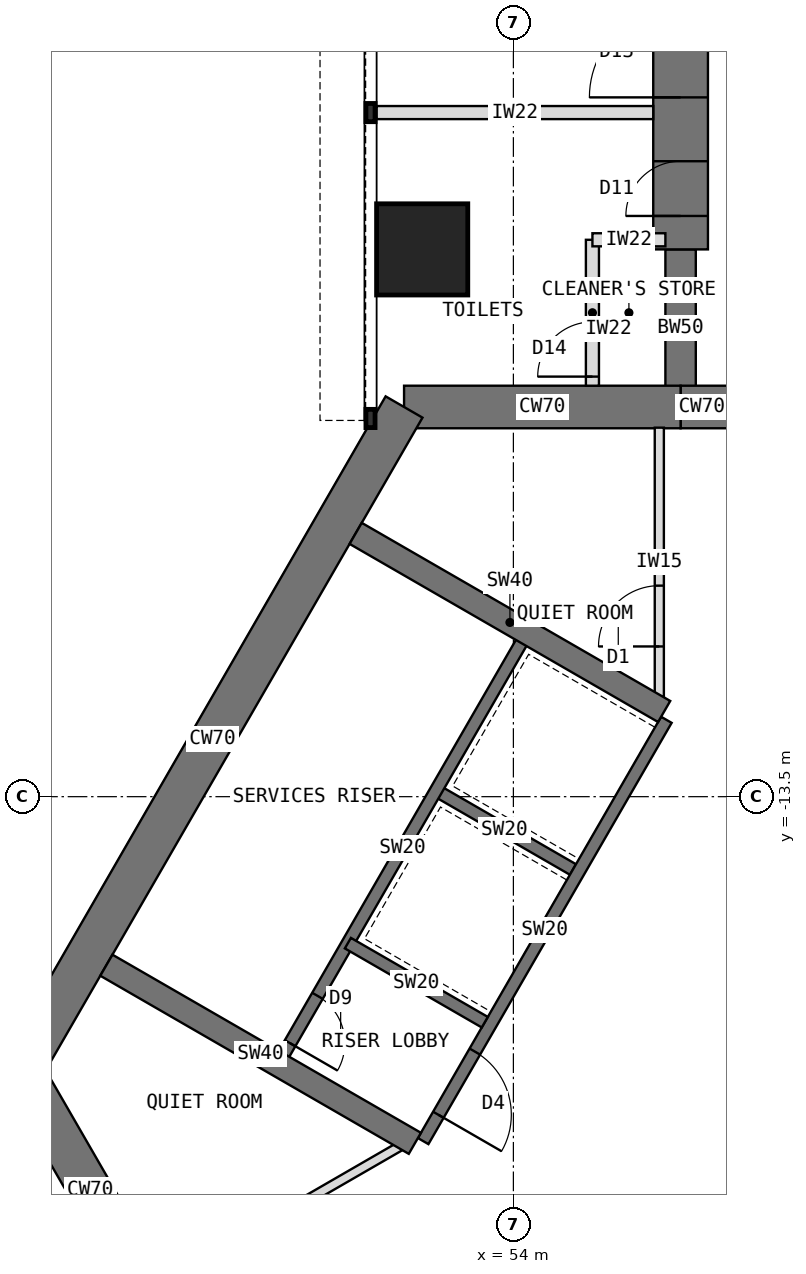
"""IFC4 building model, lengths in metres.
Left out: names, types, materials, properties, quantities, classifications, styles, units other than length and angle.
Written with IfcOpenShell. Run it as: python <this file> out.ifc"""

import sys

from ifc_helpers import new_model, si_unit, direction, frame, frame_2d, origin, origin_2d, place, context, subcontext, project, spatial, rectangle, extrude, element, fill, save


model = new_model("IFC4")
c1 = context("Model", 3, precision=1e-05, world=origin(), true_north=direction((0.0, 1.0)))
c2 = subcontext(c1, "Body", "Model", "MODEL_VIEW")
j1 = project(units=[si_unit("LENGTHUNIT", "METRE"), si_unit("PLANEANGLEUNIT", "RADIAN")], contexts=[c1])
p1 = place(None, origin())
s1 = spatial("IfcSite", under=j1, at=p1, CompositionType="ELEMENT")
p2 = place(p1, origin())
s2 = spatial("IfcBuilding", under=s1, at=p2, CompositionType="ELEMENT")
p3 = place(p2, frame((0.0, 0.0, 36.5)))
s3 = spatial("IfcBuildingStorey", under=s2, at=p3, CompositionType="ELEMENT", Elevation=36.5)
p4 = place(p3, frame((60.25, -7.092, 0.0), z_axis=(0.0, 0.0, 1.0), x_axis=(-1.0, 0.0, 0.0)))
e1 = element("IfcWall", 1, at=p4, inside=s3, PredefinedType="SHEAR", context=c2, shape_type="SweptSolid", body=[
    extrude(rectangle(XDim=3.5, YDim=0.7, at=frame_2d((1.75, 0.0))), origin(), (0.0, 0.0, 1.0), 4.0),
])
p5 = place(p4, frame((0.85, 0.0, 0.0)))
e2 = element("IfcOpeningElement", 2, at=p5, cuts=e1, PredefinedType="OPENING", context=c2, shape_type="SweptSolid", body=[
    extrude(rectangle(XDim=1.8, YDim=2.1, at=frame_2d((0.9, 1.05))), frame((0.0, 0.36, 0.0), z_axis=(0.0, -1.0, 0.0), x_axis=(1.0, 0.0, 0.0)), (0.0, 0.0, 1.0), 0.72),
])
p6 = place(p3, frame((56.75, -7.092, 0.0), z_axis=(0.0, 0.0, 1.0), x_axis=(-1.0, 0.0, 0.0)))
e3 = element("IfcWall", 3, at=p6, inside=s3, PredefinedType="SHEAR", context=c2, shape_type="SweptSolid", body=[
    extrude(rectangle(XDim=4.548, YDim=0.7, at=frame_2d((2.274, 0.0))), origin(), (0.0, 0.0, 1.0), 4.0),
])
p7 = place(p3, frame((52.202, -7.092, 0.0), z_axis=(0.0, 0.0, 1.0), x_axis=(-0.500005998175, -0.866021940709, 0.0)))
e4 = element("IfcWall", 4, at=p7, inside=s3, PredefinedType="SHEAR", context=c2, shape_type="SweptSolid", body=[
    extrude(rectangle(XDim=12.596, YDim=0.7, at=frame_2d((6.298, 0.0))), origin(), (0.0, 0.0, 1.0), 4.0),
])
p8 = place(p3, frame((45.904, -18.0, 0.0), z_axis=(0.0, 0.0, 1.0), x_axis=(0.500024481964, -0.866011268655, 0.0)))
e5 = element("IfcWall", 5, at=p8, inside=s3, PredefinedType="SHEAR", context=c2, shape_type="SweptSolid", body=[
    extrude(rectangle(XDim=4.548, YDim=0.7, at=frame_2d((2.274, 0.0))), origin(), (0.0, 0.0, 1.0), 4.0),
])
p9 = place(p3, frame((56.75, -7.092, 0.0), z_axis=(0.0, 0.0, 1.0), x_axis=(0.0, 1.0, 0.0)))
e6 = element("IfcWall", 6, at=p9, inside=s3, PredefinedType="SHEAR", context=c2, shape_type="SweptSolid", body=[
    extrude(rectangle(XDim=2.592, YDim=0.5, at=frame_2d((1.296, 0.0))), origin(), (0.0, 0.0, 1.0), 4.0),
])
p10 = place(p3, frame((56.75, -4.5, 0.0), z_axis=(0.0, 0.0, 1.0), x_axis=(0.0, 1.0, 0.0)))
e7 = element("IfcWall", 7, at=p10, inside=s3, PredefinedType="SHEAR", context=c2, shape_type="SweptSolid", body=[
    extrude(rectangle(XDim=13.2, YDim=0.9, at=frame_2d((6.6, 0.0))), origin(), (0.0, 0.0, 1.0), 4.0),
])
p11 = place(p10, frame((0.55, 0.0, 0.0)))
e8 = element("IfcOpeningElement", 8, at=p11, cuts=e7, PredefinedType="OPENING", context=c2, shape_type="SweptSolid", body=[
    extrude(rectangle(XDim=0.9, YDim=2.1, at=frame_2d((0.45, 1.05))), frame((0.0, 0.46, 0.0), z_axis=(0.0, -1.0, 0.0), x_axis=(1.0, 0.0, 0.0)), (0.0, 0.0, 1.0), 0.92),
])
p12 = place(p10, frame((2.5, 0.0, 0.0)))
e9 = element("IfcOpeningElement", 9, at=p12, cuts=e7, PredefinedType="OPENING", context=c2, shape_type="SweptSolid", body=[
    extrude(rectangle(XDim=1.5, YDim=2.1, at=frame_2d((0.75, 1.05))), frame((0.0, 0.46, 0.0), z_axis=(0.0, -1.0, 0.0), x_axis=(1.0, 0.0, 0.0)), (0.0, 0.0, 1.0), 0.92),
])
p13 = place(p3, frame((52.5, -4.5, 0.0), z_axis=(0.0, 0.0, 1.0), x_axis=(1.0, 0.0, 0.0)))
e10 = element("IfcColumn", 10, at=p13, inside=s3, PredefinedType="COLUMN", context=c2, shape_type="SweptSolid", body=[
    extrude(rectangle(XDim=1.5, YDim=1.5, at=origin_2d()), origin(), (0.0, 0.0, 1.0), 4.0),
])
p14 = place(p3, frame((56.516, -12.236, 0.0), z_axis=(0.0, 0.0, 1.0), x_axis=(-0.49999894854, -0.866026010844, 0.0)))
e11 = element("IfcWall", 11, at=p14, inside=s3, PredefinedType="SHEAR", context=c2, shape_type="SweptSolid", body=[
    extrude(rectangle(XDim=8.0, YDim=0.2, at=frame_2d((4.0, 0.0))), origin(), (0.0, 0.0, 1.0), 4.0),
])
p15 = place(p14, frame((6.3, 0.0, 0.0)))
e12 = element("IfcOpeningElement", 12, at=p15, cuts=e11, PredefinedType="OPENING", context=c2, shape_type="SweptSolid", body=[
    extrude(rectangle(XDim=1.2, YDim=2.1, at=frame_2d((0.6, 1.05))), frame((0.0, 0.11, 0.0), z_axis=(0.0, -1.0, 0.0), x_axis=(1.0, 0.0, 0.0)), (0.0, 0.0, 1.0), 0.22),
])
for number, where, z_axis, x_axis in (
    (13, (54.98, -14.697, 0.0), (0.0, 0.0, 1.0), (-0.866, 0.5, 0.0)),
    (14, (53.53, -17.209, 0.0), (0.0, 0.0, 1.0), (-0.866, 0.5, 0.0)),
):
    element("IfcWall", number, at=place(p3, frame(where, z_axis=z_axis, x_axis=x_axis)), inside=s3, PredefinedType="SHEAR", context=c2, shape_type="SweptSolid", body=[
        extrude(rectangle(XDim=2.6, YDim=0.2, at=frame_2d((1.3, 0.0))), origin(), (0.0, 0.0, 1.0), 4.0),
    ])
p16 = place(p3, frame((54.178, -10.886, 0.0), z_axis=(0.0, 0.0, 1.0), x_axis=(-0.49999894854, -0.866026010844, 0.0)))
e15 = element("IfcWall", 15, at=p16, inside=s3, PredefinedType="SHEAR", context=c2, shape_type="SweptSolid", body=[
    extrude(rectangle(XDim=8.0, YDim=0.2, at=frame_2d((4.0, 0.0))), origin(), (0.0, 0.0, 1.0), 4.0),
])
p17 = place(p16, frame((6.8, 0.0, 0.0)))
e16 = element("IfcOpeningElement", 16, at=p17, cuts=e15, PredefinedType="OPENING", context=c2, shape_type="SweptSolid", body=[
    extrude(rectangle(XDim=0.9, YDim=2.1, at=frame_2d((0.45, 1.05))), frame((0.0, 0.11, 0.0), z_axis=(0.0, -1.0, 0.0), x_axis=(1.0, 0.0, 0.0)), (0.0, 0.0, 1.0), 0.22),
])
for number, where, z_axis, x_axis in (
    (17, (52.38, -19.201, 0.0), (0.0, 0.0, 1.0), (-0.866, 0.5, 0.0)),
    (18, (56.48, -12.099, 0.0), (0.0, 0.0, 1.0), (-0.866, 0.5, 0.0)),
):
    element("IfcWall", number, at=place(p3, frame(where, z_axis=z_axis, x_axis=x_axis)), inside=s3, PredefinedType="SHEAR", context=c2, shape_type="SweptSolid", body=[
        extrude(rectangle(XDim=5.858, YDim=0.4, at=frame_2d((2.929, 0.0))), origin(), (0.0, 0.0, 1.0), 4.0),
    ])
p18 = place(p3, frame((56.3, -2.25, 0.0), z_axis=(0.0, 0.0, 1.0), x_axis=(-1.0, 0.0, 0.0)))
e19 = element("IfcWall", 19, at=p18, inside=s3, PredefinedType="PARTITIONING", context=c2, shape_type="SweptSolid", body=[
    extrude(rectangle(XDim=4.55, YDim=0.215, at=frame_2d((2.275, 0.0))), origin(), (0.0, 0.0, 1.0), 3.8),
])
p19 = place(p3, frame((55.3, -6.742, 0.0), z_axis=(0.0, 0.0, 1.0), x_axis=(0.0, 1.0, 0.0)))
e20 = element("IfcWall", 20, at=p19, inside=s3, PredefinedType="PARTITIONING", context=c2, shape_type="SweptSolid", body=[
    extrude(rectangle(XDim=2.4, YDim=0.215, at=frame_2d((1.2, 0.0))), origin(), (0.0, 0.0, 1.0), 3.8),
])
p20 = place(p19, frame((0.15, 0.0, 0.0)))
e21 = element("IfcOpeningElement", 21, at=p20, cuts=e20, PredefinedType="OPENING", context=c2, shape_type="SweptSolid", body=[
    extrude(rectangle(XDim=0.9, YDim=2.1, at=frame_2d((0.45, 1.05))), frame((0.0, 0.117, 0.0), z_axis=(0.0, -1.0, 0.0), x_axis=(1.0, 0.0, 0.0)), (0.0, 0.0, 1.0), 0.235),
])
p21 = place(p3, frame((56.5, -4.342, 0.0), z_axis=(0.0, 0.0, 1.0), x_axis=(-1.0, 0.0, 0.0)))
e22 = element("IfcWall", 22, at=p21, inside=s3, PredefinedType="PARTITIONING", context=c2, shape_type="SweptSolid", body=[
    extrude(rectangle(XDim=1.2, YDim=0.215, at=frame_2d((0.6, 0.0))), origin(), (0.0, 0.0, 1.0), 3.8),
])
p22 = place(p3, frame((48.298, -21.466, 0.0), z_axis=(0.0, 0.0, 1.0), x_axis=(0.866021148949, 0.500007369519, 0.0)))
e23 = element("IfcWall", 23, at=p22, inside=s3, PredefinedType="PARTITIONING", context=c2, shape_type="SweptSolid", body=[
    extrude(rectangle(XDim=4.426, YDim=0.15, at=frame_2d((2.213, 0.0))), origin(), (0.0, 0.0, 1.0), 3.8),
])
p23 = place(p22, frame((0.828, 0.0, 0.0)))
e24 = element("IfcOpeningElement", 24, at=p23, cuts=e23, PredefinedType="OPENING", context=c2, shape_type="SweptSolid", body=[
    extrude(rectangle(XDim=1.0, YDim=2.1, at=frame_2d((0.5, 1.05))), frame((0.0, 0.085, 0.0), z_axis=(0.0, -1.0, 0.0), x_axis=(1.0, 0.0, 0.0)), (0.0, 0.0, 1.0), 0.17),
])
p24 = place(p3, frame((56.4, -11.857, 0.0), z_axis=(0.0, 0.0, 1.0), x_axis=(0.0, 1.0, 0.0)))
e25 = element("IfcWall", 25, at=p24, inside=s3, PredefinedType="PARTITIONING", context=c2, shape_type="SweptSolid", body=[
    extrude(rectangle(XDim=4.426, YDim=0.15, at=frame_2d((2.213, 0.0))), origin(), (0.0, 0.0, 1.0), 3.8),
])
p25 = place(p24, frame((0.828, 0.0, 0.0)))
e26 = element("IfcOpeningElement", 26, at=p25, cuts=e25, PredefinedType="OPENING", context=c2, shape_type="SweptSolid", body=[
    extrude(rectangle(XDim=1.0, YDim=2.1, at=frame_2d((0.5, 1.05))), frame((0.0, 0.085, 0.0), z_axis=(0.0, -1.0, 0.0), x_axis=(1.0, 0.0, 0.0)), (0.0, 0.0, 1.0), 0.17),
])
p26 = place(p15, origin())
e27 = element("IfcDoor", 27, at=p26, inside=s3, OperationType="SINGLE_SWING_RIGHT", PredefinedType="DOOR", context=c2, shape_type="SweptSolid", body=[
    extrude(rectangle(XDim=1.2, YDim=2.1, at=frame_2d((0.6, 1.05))), frame((0.0, 0.025, 0.0), z_axis=(0.0, -1.0, 0.0), x_axis=(1.0, 0.0, 0.0)), (0.0, 0.0, 1.0), 0.05),
])
fill(e12, e27)
p27 = place(p17, origin())
e28 = element("IfcDoor", 28, at=p27, inside=s3, OperationType="SINGLE_SWING_RIGHT", PredefinedType="DOOR", context=c2, shape_type="SweptSolid", body=[
    extrude(rectangle(XDim=0.9, YDim=2.1, at=frame_2d((0.45, 1.05))), frame((0.0, 0.025, 0.0), z_axis=(0.0, -1.0, 0.0), x_axis=(1.0, 0.0, 0.0)), (0.0, 0.0, 1.0), 0.05),
])
fill(e16, e28)
p28 = place(p20, origin())
e29 = element("IfcDoor", 29, at=p28, inside=s3, OperationType="SINGLE_SWING_LEFT", PredefinedType="DOOR", context=c2, shape_type="SweptSolid", body=[
    extrude(rectangle(XDim=0.9, YDim=2.1, at=frame_2d((0.45, 1.05))), frame((0.0, 0.025, 0.0), z_axis=(0.0, -1.0, 0.0), x_axis=(1.0, 0.0, 0.0)), (0.0, 0.0, 1.0), 0.05),
])
fill(e21, e29)
p29 = place(p25, origin())
e30 = element("IfcDoor", 30, at=p29, inside=s3, OperationType="SINGLE_SWING_LEFT", PredefinedType="DOOR", context=c2, shape_type="SweptSolid", body=[
    extrude(rectangle(XDim=1.0, YDim=2.1, at=frame_2d((0.5, 1.05))), frame((0.0, 0.025, 0.0), z_axis=(0.0, -1.0, 0.0), x_axis=(1.0, 0.0, 0.0)), (0.0, 0.0, 1.0), 0.05),
])
fill(e26, e30)
p30 = place(p11, origin())
e31 = element("IfcDoor", 31, at=p30, inside=s3, OperationType="SINGLE_SWING_LEFT", PredefinedType="DOOR", context=c2, shape_type="SweptSolid", body=[
    extrude(rectangle(XDim=0.82, YDim=2.06, at=frame_2d((0.45, 1.03))), frame((0.0, 0.025, 0.0), z_axis=(0.0, -1.0, 0.0), x_axis=(1.0, 0.0, 0.0)), (0.0, 0.0, 1.0), 0.05),
    extrude(rectangle(XDim=0.04, YDim=2.1, at=frame_2d((0.02, 1.05))), frame((0.0, 0.45, 0.0), z_axis=(0.0, -1.0, 0.0), x_axis=(1.0, 0.0, 0.0)), (0.0, 0.0, 1.0), 0.899),
    extrude(rectangle(XDim=0.04, YDim=2.1, at=frame_2d((0.88, 1.05))), frame((0.0, 0.45, 0.0), z_axis=(0.0, -1.0, 0.0), x_axis=(1.0, 0.0, 0.0)), (0.0, 0.0, 1.0), 0.899),
    extrude(rectangle(XDim=0.82, YDim=0.04, at=frame_2d((0.45, 2.08))), frame((0.0, 0.45, 0.0), z_axis=(0.0, -1.0, 0.0), x_axis=(1.0, 0.0, 0.0)), (0.0, 0.0, 1.0), 0.899),
])
fill(e8, e31)
p31 = place(p12, origin())
e32 = element("IfcDoor", 32, at=p31, inside=s3, OperationType="DOUBLE_DOOR_SINGLE_SWING", PredefinedType="DOOR", context=c2, shape_type="SweptSolid", body=[
    extrude(rectangle(XDim=1.42, YDim=2.06, at=frame_2d((0.75, 1.03))), frame((0.0, 0.025, 0.0), z_axis=(0.0, -1.0, 0.0), x_axis=(1.0, 0.0, 0.0)), (0.0, 0.0, 1.0), 0.05),
    extrude(rectangle(XDim=0.04, YDim=2.1, at=frame_2d((0.02, 1.05))), frame((0.0, 0.45, 0.0), z_axis=(0.0, -1.0, 0.0), x_axis=(1.0, 0.0, 0.0)), (0.0, 0.0, 1.0), 0.899),
    extrude(rectangle(XDim=0.04, YDim=2.1, at=frame_2d((1.48, 1.05))), frame((0.0, 0.45, 0.0), z_axis=(0.0, -1.0, 0.0), x_axis=(1.0, 0.0, 0.0)), (0.0, 0.0, 1.0), 0.899),
    extrude(rectangle(XDim=1.42, YDim=0.04, at=frame_2d((0.75, 2.08))), frame((0.0, 0.45, 0.0), z_axis=(0.0, -1.0, 0.0), x_axis=(1.0, 0.0, 0.0)), (0.0, 0.0, 1.0), 0.899),
])
fill(e9, e32)
save(model, sys.argv[1])
